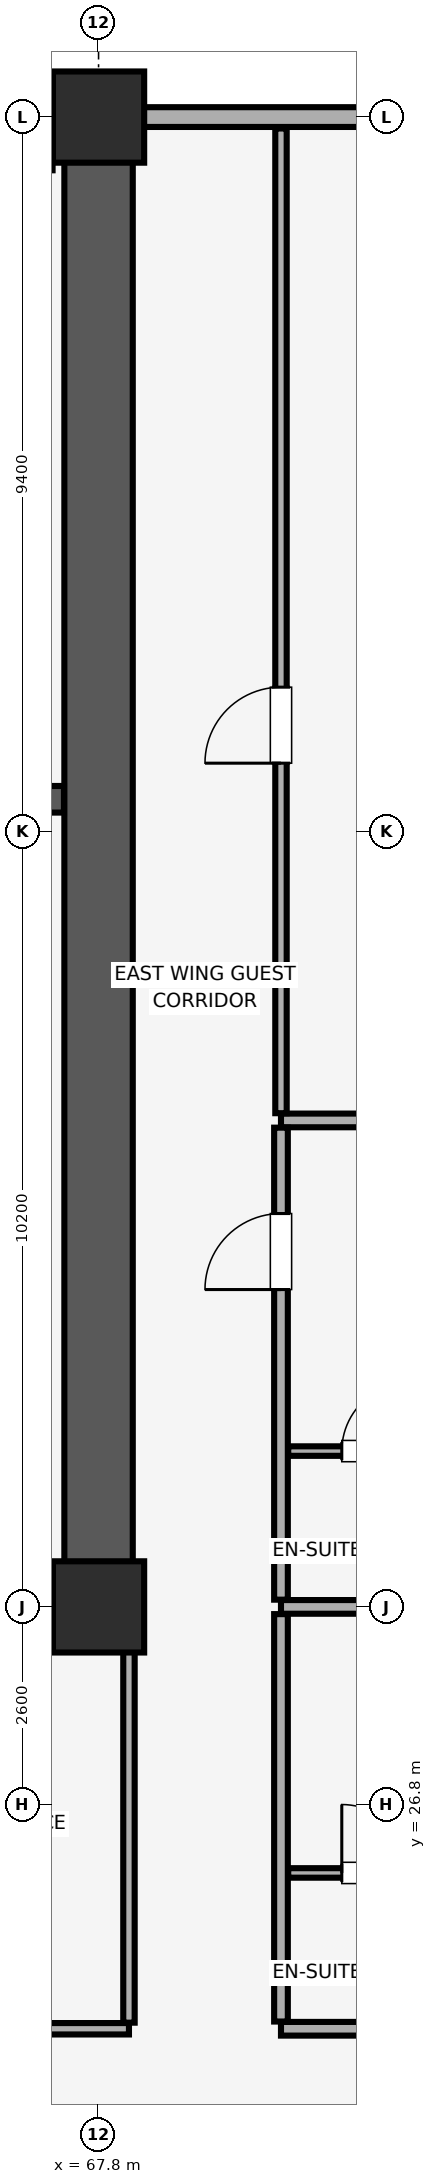
"""IFC4 building model, lengths in metres.
Left out: names, types, materials, properties, quantities, classifications, styles, units other than length and angle.
Written with IfcOpenShell. Run it as: python <this file> out.ifc"""

import sys

from ifc_helpers import new_model, si_unit, direction, frame, frame_2d, origin, origin_2d, place, context, subcontext, project, spatial, rectangle, extrude, element, fill, save


model = new_model("IFC4")
c1 = context("Model", 3, precision=1e-05, world=origin(), true_north=direction((0.0, 1.0)))
c2 = subcontext(c1, "Body", "Model", "MODEL_VIEW")
j1 = project(units=[si_unit("LENGTHUNIT", "METRE"), si_unit("PLANEANGLEUNIT", "RADIAN")], contexts=[c1])
p1 = place(None, origin())
s1 = spatial("IfcSite", under=j1, at=p1, CompositionType="ELEMENT")
p2 = place(p1, origin())
s2 = spatial("IfcBuilding", under=s1, at=p2, CompositionType="ELEMENT")
p3 = place(p2, frame((0.0, 0.0, 104.3)))
s3 = spatial("IfcBuildingStorey", under=s2, at=p3, CompositionType="ELEMENT", Elevation=104.3)
for number, where, z_axis, x_axis in (
    (1, (67.8, 29.4, 0.0), (0.0, 0.0, 1.0), (1.0, 0.0, 0.0)),
    (2, (67.8, 49.0, 0.0), (0.0, 0.0, 1.0), (1.0, 0.0, 0.0)),
):
    element("IfcColumn", number, at=place(p3, frame(where, z_axis=z_axis, x_axis=x_axis)), inside=s3, PredefinedType="COLUMN", context=c2, shape_type="SweptSolid", body=[
        extrude(rectangle(XDim=1.2, YDim=1.2, at=origin_2d()), origin(), (0.0, 0.0, 1.0), 3.51),
    ])
p4 = place(p3, frame((79.8, 49.0, 0.0), z_axis=(0.0, 0.0, 1.0), x_axis=(-1.0, 0.0, 0.0)))
e3 = element("IfcWall", 3, at=p4, inside=s3, PredefinedType="SOLIDWALL", context=c2, shape_type="SweptSolid", body=[
    extrude(rectangle(XDim=75.6, YDim=0.26, at=frame_2d((37.8, 0.0))), origin(), (0.0, 0.0, 1.0), 2.56),
])
p5 = place(p4, frame((72.565, 0.0, 0.85)))
e4 = element("IfcOpeningElement", 4, at=p5, cuts=e3, PredefinedType="OPENING", context=c2, shape_type="SweptSolid", body=[
    extrude(rectangle(XDim=1.5, YDim=1.4, at=frame_2d((0.75, 0.7))), frame((0.0, 0.14, 0.0), z_axis=(0.0, -1.0, 0.0), x_axis=(1.0, 0.0, 0.0)), (0.0, 0.0, 1.0), 0.28),
])
p6 = place(p4, frame((67.45, 0.0, 0.85)))
e5 = element("IfcOpeningElement", 5, at=p6, cuts=e3, PredefinedType="OPENING", context=c2, shape_type="SweptSolid", body=[
    extrude(rectangle(XDim=1.5, YDim=1.4, at=frame_2d((0.75, 0.7))), frame((0.0, 0.14, 0.0), z_axis=(0.0, -1.0, 0.0), x_axis=(1.0, 0.0, 0.0)), (0.0, 0.0, 1.0), 0.28),
])
p7 = place(p4, frame((6.65, 0.0, 0.85)))
e6 = element("IfcOpeningElement", 6, at=p7, cuts=e3, PredefinedType="OPENING", context=c2, shape_type="SweptSolid", body=[
    extrude(rectangle(XDim=1.5, YDim=1.4, at=frame_2d((0.75, 0.7))), frame((0.0, 0.14, 0.0), z_axis=(0.0, -1.0, 0.0), x_axis=(1.0, 0.0, 0.0)), (0.0, 0.0, 1.0), 0.28),
])
p8 = place(p4, frame((1.535, 0.0, 0.85)))
e7 = element("IfcOpeningElement", 7, at=p8, cuts=e3, PredefinedType="OPENING", context=c2, shape_type="SweptSolid", body=[
    extrude(rectangle(XDim=1.5, YDim=1.4, at=frame_2d((0.75, 0.7))), frame((0.0, 0.14, 0.0), z_axis=(0.0, -1.0, 0.0), x_axis=(1.0, 0.0, 0.0)), (0.0, 0.0, 1.0), 0.28),
])
p9 = place(p4, frame((51.365, 0.0, 0.9)))
e8 = element("IfcOpeningElement", 8, at=p9, cuts=e3, PredefinedType="OPENING", context=c2, shape_type="SweptSolid", body=[
    extrude(rectangle(XDim=1.5, YDim=1.4, at=frame_2d((0.75, 0.7))), frame((0.0, 0.14, 0.0), z_axis=(0.0, -1.0, 0.0), x_axis=(1.0, 0.0, 0.0)), (0.0, 0.0, 1.0), 0.28),
])
p10 = place(p4, frame((46.0, 0.0, 0.9)))
e9 = element("IfcOpeningElement", 9, at=p10, cuts=e3, PredefinedType="OPENING", context=c2, shape_type="SweptSolid", body=[
    extrude(rectangle(XDim=1.5, YDim=1.4, at=frame_2d((0.75, 0.7))), frame((0.0, 0.14, 0.0), z_axis=(0.0, -1.0, 0.0), x_axis=(1.0, 0.0, 0.0)), (0.0, 0.0, 1.0), 0.28),
])
p11 = place(p4, frame((29.15, 0.0, 0.9)))
e10 = element("IfcOpeningElement", 10, at=p11, cuts=e3, PredefinedType="OPENING", context=c2, shape_type="SweptSolid", body=[
    extrude(rectangle(XDim=1.5, YDim=1.4, at=frame_2d((0.75, 0.7))), frame((0.0, 0.14, 0.0), z_axis=(0.0, -1.0, 0.0), x_axis=(1.0, 0.0, 0.0)), (0.0, 0.0, 1.0), 0.28),
])
p12 = place(p4, frame((23.485, 0.0, 0.9)))
e11 = element("IfcOpeningElement", 11, at=p12, cuts=e3, PredefinedType="OPENING", context=c2, shape_type="SweptSolid", body=[
    extrude(rectangle(XDim=1.5, YDim=1.4, at=frame_2d((0.75, 0.7))), frame((0.0, 0.14, 0.0), z_axis=(0.0, -1.0, 0.0), x_axis=(1.0, 0.0, 0.0)), (0.0, 0.0, 1.0), 0.28),
])
p13 = place(p3, frame((67.8, 29.4, 0.0), z_axis=(0.0, 0.0, 1.0), x_axis=(0.0, 1.0, 0.0)))
e12 = element("IfcWall", 12, at=p13, inside=s3, PredefinedType="SHEAR", context=c2, shape_type="SweptSolid", body=[
    extrude(rectangle(XDim=19.2, YDim=0.9, at=frame_2d((9.6, 0.0))), origin(), (0.0, 0.0, 1.0), 3.51),
])
p14 = place(p3, frame((60.4, 29.4, 0.0), z_axis=(0.0, 0.0, 1.0), x_axis=(1.0, 0.0, 0.0)))
e13 = element("IfcWall", 13, at=p14, inside=s3, PredefinedType="SHEAR", context=c2, shape_type="SweptSolid", body=[
    extrude(rectangle(XDim=6.945, YDim=0.9, at=frame_2d((3.473, 0.0))), origin(), (0.0, 0.0, 1.0), 3.51),
])
p15 = place(p3, frame((63.145, 40.025, 0.0), z_axis=(0.0, 0.0, 1.0), x_axis=(1.0, 0.0, 0.0)))
e14 = element("IfcWall", 14, at=p15, inside=s3, PredefinedType="SHEAR", context=c2, shape_type="SweptSolid", body=[
    extrude(rectangle(XDim=4.2, YDim=0.35, at=frame_2d((2.1, 0.0))), origin(), (0.0, 0.0, 1.0), 3.51),
])
p16 = place(p15, frame((1.24, 0.0, 0.0)))
e15 = element("IfcOpeningElement", 15, at=p16, cuts=e14, PredefinedType="OPENING", context=c2, shape_type="SweptSolid", body=[
    extrude(rectangle(XDim=1.15, YDim=2.15, at=frame_2d((0.575, 1.075))), frame((0.0, 0.185, 0.0), z_axis=(0.0, -1.0, 0.0), x_axis=(1.0, 0.0, 0.0)), (0.0, 0.0, 1.0), 0.37),
])
p17 = place(p3, frame((57.88, 23.85, 0.0), z_axis=(0.0, 0.0, 1.0), x_axis=(1.0, 0.0, 0.0)))
e16 = element("IfcWall", 16, at=p17, inside=s3, PredefinedType="PARTITIONING", context=c2, shape_type="SweptSolid", body=[
    extrude(rectangle(XDim=10.32, YDim=0.15, at=frame_2d((5.16, 0.0))), origin(), (0.0, 0.0, 1.0), 3.51),
])
p18 = place(p17, frame((4.62, 0.0, 0.0)))
e17 = element("IfcOpeningElement", 17, at=p18, cuts=e16, PredefinedType="OPENING", context=c2, shape_type="SweptSolid", body=[
    extrude(rectangle(XDim=1.0, YDim=2.15, at=frame_2d((0.5, 1.075))), frame((0.0, 0.085, 0.0), z_axis=(0.0, -1.0, 0.0), x_axis=(1.0, 0.0, 0.0)), (0.0, 0.0, 1.0), 0.17),
])
p19 = place(p3, frame((68.2, 23.93, 0.0), z_axis=(0.0, 0.0, 1.0), x_axis=(0.0, 1.0, 0.0)))
e18 = element("IfcWall", 18, at=p19, inside=s3, PredefinedType="PARTITIONING", context=c2, shape_type="SweptSolid", body=[
    extrude(rectangle(XDim=5.46, YDim=0.15, at=frame_2d((2.73, 0.0))), origin(), (0.0, 0.0, 1.0), 3.51),
])
p20 = place(p3, frame((70.2, 23.85, 0.0), z_axis=(0.0, 0.0, 1.0), x_axis=(1.0, 0.0, 0.0)))
e19 = element("IfcWall", 19, at=p20, inside=s3, PredefinedType="PARTITIONING", context=c2, shape_type="SweptSolid", body=[
    extrude(rectangle(XDim=13.65, YDim=0.18, at=frame_2d((6.825, 0.0))), origin(), (0.0, 0.0, 1.0), 3.51),
])
p21 = place(p20, frame((6.965, 0.0, 0.0)))
e20 = element("IfcOpeningElement", 20, at=p21, cuts=e19, PredefinedType="OPENING", context=c2, shape_type="SweptSolid", body=[
    extrude(rectangle(XDim=1.0, YDim=2.15, at=frame_2d((0.5, 1.075))), frame((0.0, 0.1, 0.0), z_axis=(0.0, -1.0, 0.0), x_axis=(1.0, 0.0, 0.0)), (0.0, 0.0, 1.0), 0.2),
])
p22 = place(p3, frame((70.2, 29.4, 0.0), z_axis=(0.0, 0.0, 1.0), x_axis=(1.0, 0.0, 0.0)))
e21 = element("IfcWall", 21, at=p22, inside=s3, PredefinedType="PARTITIONING", context=c2, shape_type="SweptSolid", body=[
    extrude(rectangle(XDim=13.65, YDim=0.18, at=frame_2d((6.825, 0.0))), origin(), (0.0, 0.0, 1.0), 2.86),
])
p23 = place(p3, frame((70.2, 23.945, 0.0), z_axis=(0.0, 0.0, 1.0), x_axis=(0.0, 1.0, 0.0)))
e22 = element("IfcWall", 22, at=p23, inside=s3, PredefinedType="PARTITIONING", context=c2, shape_type="SweptSolid", body=[
    extrude(rectangle(XDim=5.36, YDim=0.18, at=frame_2d((2.68, 0.0))), origin(), (0.0, 0.0, 1.0), 3.51),
])
p24 = place(p3, frame((70.295, 25.9, 0.0), z_axis=(0.0, 0.0, 1.0), x_axis=(1.0, 0.0, 0.0)))
e23 = element("IfcWall", 23, at=p24, inside=s3, PredefinedType="PARTITIONING", context=c2, shape_type="SweptSolid", body=[
    extrude(rectangle(XDim=2.405, YDim=0.125, at=frame_2d((1.203, 0.0))), origin(), (0.0, 0.0, 1.0), 3.51),
])
p25 = place(p24, frame((0.705, 0.0, 0.0)))
e24 = element("IfcOpeningElement", 24, at=p25, cuts=e23, PredefinedType="OPENING", context=c2, shape_type="SweptSolid", body=[
    extrude(rectangle(XDim=0.9, YDim=2.1, at=frame_2d((0.45, 1.05))), frame((0.0, 0.073, 0.0), z_axis=(0.0, -1.0, 0.0), x_axis=(1.0, 0.0, 0.0)), (0.0, 0.0, 1.0), 0.145),
])
p26 = place(p3, frame((70.2, 35.8, 0.0), z_axis=(0.0, 0.0, 1.0), x_axis=(1.0, 0.0, 0.0)))
e25 = element("IfcWall", 25, at=p26, inside=s3, PredefinedType="PARTITIONING", context=c2, shape_type="SweptSolid", body=[
    extrude(rectangle(XDim=13.65, YDim=0.18, at=frame_2d((6.825, 0.0))), origin(), (0.0, 0.0, 1.0), 3.51),
])
p27 = place(p3, frame((70.2, 29.495, 0.0), z_axis=(0.0, 0.0, 1.0), x_axis=(0.0, 1.0, 0.0)))
e26 = element("IfcWall", 26, at=p27, inside=s3, PredefinedType="PARTITIONING", context=c2, shape_type="SweptSolid", body=[
    extrude(rectangle(XDim=6.21, YDim=0.18, at=frame_2d((3.105, 0.0))), origin(), (0.0, 0.0, 1.0), 3.51),
])
p28 = place(p27, frame((4.08, 0.0, 0.0)))
e27 = element("IfcOpeningElement", 27, at=p28, cuts=e26, PredefinedType="OPENING", context=c2, shape_type="SweptSolid", body=[
    extrude(rectangle(XDim=1.0, YDim=2.15, at=frame_2d((0.5, 1.075))), frame((0.0, 0.1, 0.0), z_axis=(0.0, -1.0, 0.0), x_axis=(1.0, 0.0, 0.0)), (0.0, 0.0, 1.0), 0.2),
])
p29 = place(p3, frame((70.295, 31.45, 0.0), z_axis=(0.0, 0.0, 1.0), x_axis=(1.0, 0.0, 0.0)))
e28 = element("IfcWall", 28, at=p29, inside=s3, PredefinedType="PARTITIONING", context=c2, shape_type="SweptSolid", body=[
    extrude(rectangle(XDim=2.405, YDim=0.125, at=frame_2d((1.203, 0.0))), origin(), (0.0, 0.0, 1.0), 3.51),
])
p30 = place(p29, frame((0.705, 0.0, 0.0)))
e29 = element("IfcOpeningElement", 29, at=p30, cuts=e28, PredefinedType="OPENING", context=c2, shape_type="SweptSolid", body=[
    extrude(rectangle(XDim=0.9, YDim=2.1, at=frame_2d((0.45, 1.05))), frame((0.0, 0.073, 0.0), z_axis=(0.0, -1.0, 0.0), x_axis=(1.0, 0.0, 0.0)), (0.0, 0.0, 1.0), 0.145),
])
p31 = place(p3, frame((70.2, 35.895, 0.0), z_axis=(0.0, 0.0, 1.0), x_axis=(0.0, 1.0, 0.0)))
e30 = element("IfcWall", 30, at=p31, inside=s3, PredefinedType="PARTITIONING", context=c2, shape_type="SweptSolid", body=[
    extrude(rectangle(XDim=12.955, YDim=0.15, at=frame_2d((6.478, 0.0))), origin(), (0.0, 0.0, 1.0), 3.51),
])
p32 = place(p31, frame((4.605, 0.0, 0.0)))
e31 = element("IfcOpeningElement", 31, at=p32, cuts=e30, PredefinedType="OPENING", context=c2, shape_type="SweptSolid", body=[
    extrude(rectangle(XDim=1.0, YDim=2.15, at=frame_2d((0.5, 1.075))), frame((0.0, 0.085, 0.0), z_axis=(0.0, -1.0, 0.0), x_axis=(1.0, 0.0, 0.0)), (0.0, 0.0, 1.0), 0.17),
])
p33 = place(p25, origin())
e32 = element("IfcDoor", 32, at=p33, inside=s3, OperationType="SINGLE_SWING_LEFT", PredefinedType="DOOR", context=c2, shape_type="SweptSolid", body=[
    extrude(rectangle(XDim=0.9, YDim=2.1, at=frame_2d((0.45, 1.05))), frame((0.0, 0.025, 0.0), z_axis=(0.0, -1.0, 0.0), x_axis=(1.0, 0.0, 0.0)), (0.0, 0.0, 1.0), 0.05),
])
fill(e24, e32)
p34 = place(p28, origin())
e33 = element("IfcDoor", 33, at=p34, inside=s3, OperationType="SINGLE_SWING_LEFT", PredefinedType="DOOR", context=c2, shape_type="SweptSolid", body=[
    extrude(rectangle(XDim=1.0, YDim=2.15, at=frame_2d((0.5, 1.075))), frame((0.0, 0.025, 0.0), z_axis=(0.0, -1.0, 0.0), x_axis=(1.0, 0.0, 0.0)), (0.0, 0.0, 1.0), 0.05),
])
fill(e27, e33)
p35 = place(p30, origin())
e34 = element("IfcDoor", 34, at=p35, inside=s3, OperationType="SINGLE_SWING_RIGHT", PredefinedType="DOOR", context=c2, shape_type="SweptSolid", body=[
    extrude(rectangle(XDim=0.9, YDim=2.1, at=frame_2d((0.45, 1.05))), frame((0.0, 0.025, 0.0), z_axis=(0.0, -1.0, 0.0), x_axis=(1.0, 0.0, 0.0)), (0.0, 0.0, 1.0), 0.05),
])
fill(e29, e34)
p36 = place(p32, origin())
e35 = element("IfcDoor", 35, at=p36, inside=s3, OperationType="SINGLE_SWING_LEFT", PredefinedType="DOOR", context=c2, shape_type="SweptSolid", body=[
    extrude(rectangle(XDim=1.0, YDim=2.15, at=frame_2d((0.5, 1.075))), frame((0.0, 0.025, 0.0), z_axis=(0.0, -1.0, 0.0), x_axis=(1.0, 0.0, 0.0)), (0.0, 0.0, 1.0), 0.05),
])
fill(e31, e35)
save(model, sys.argv[1])
